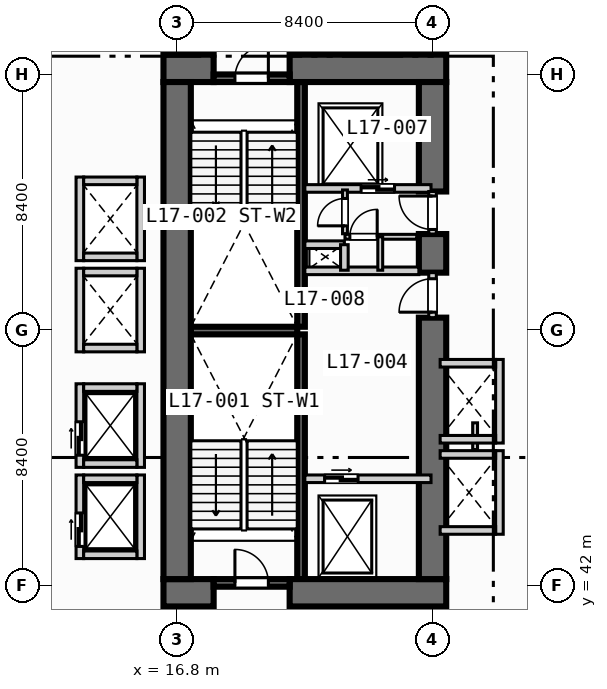
"""IFC4 building model, lengths in metres.
Left out: names, types, materials, properties, quantities, classifications, styles, units other than length and angle.
Written with IfcOpenShell. Run it as: python <this file> out.ifc"""

import sys

from ifc_helpers import new_model, si_unit, direction, frame, frame_2d, origin, place, context, subcontext, project, spatial, rectangle, extrude, element, fill, save


model = new_model("IFC4")
c1 = context("Model", 3, precision=1e-05, world=origin(), true_north=direction((0.0, 1.0)))
c2 = subcontext(c1, "Body", "Model", "MODEL_VIEW")
j1 = project(units=[si_unit("LENGTHUNIT", "METRE"), si_unit("PLANEANGLEUNIT", "RADIAN")], contexts=[c1])
p1 = place(None, origin())
s1 = spatial("IfcSite", under=j1, at=p1, CompositionType="ELEMENT")
p2 = place(p1, origin())
s2 = spatial("IfcBuilding", under=s1, at=p2, CompositionType="ELEMENT")
p3 = place(p2, frame((0.0, 0.0, 73.8)))
s3 = spatial("IfcBuildingStorey", under=s2, at=p3, CompositionType="ELEMENT", Elevation=73.8)
for number, where, z_axis, x_axis in (
    (1, (20.875, 42.2, 0.0), (0.0, 0.0, 1.0), (0.0, 1.0, 0.0)),
    (2, (20.875, 50.5, 0.0), (0.0, 0.0, 1.0), (0.0, 1.0, 0.0)),
):
    element("IfcWall", number, at=place(p3, frame(where, z_axis=z_axis, x_axis=x_axis)), inside=s3, PredefinedType="SOLIDWALL", context=c2, shape_type="SweptSolid", body=[
        extrude(rectangle(XDim=8.05, YDim=0.25, at=frame_2d((4.025, 0.0))), origin(), (0.0, 0.0, 1.0), 3.55),
    ])
p4 = place(p3, frame((17.25, 50.375, 0.0), z_axis=(0.0, 0.0, 1.0), x_axis=(1.0, 0.0, 0.0)))
e3 = element("IfcWall", 3, at=p4, inside=s3, PredefinedType="SOLIDWALL", context=c2, shape_type="SweptSolid", body=[
    extrude(rectangle(XDim=3.5, YDim=0.25, at=frame_2d((1.75, 0.0))), origin(), (0.0, 0.0, 1.0), 3.55),
])
p5 = place(p3, frame((16.35, 41.75, 0.0), z_axis=(0.0, 0.0, 1.0), x_axis=(1.0, 0.0, 0.0)))
e4 = element("IfcWall", 4, at=p5, inside=s3, PredefinedType="SHEAR", context=c2, shape_type="SweptSolid", body=[
    extrude(rectangle(XDim=1.65, YDim=0.9, at=frame_2d((0.825, 0.0))), origin(), (0.0, 0.0, 1.0), 3.55),
])
p6 = place(p3, frame((20.5, 41.75, 0.0), z_axis=(0.0, 0.0, 1.0), x_axis=(1.0, 0.0, 0.0)))
e5 = element("IfcWall", 5, at=p6, inside=s3, PredefinedType="SHEAR", context=c2, shape_type="SweptSolid", body=[
    extrude(rectangle(XDim=5.15, YDim=0.9, at=frame_2d((2.575, 0.0))), origin(), (0.0, 0.0, 1.0), 3.55),
])
p7 = place(p3, frame((16.35, 59.0, 0.0), z_axis=(0.0, 0.0, 1.0), x_axis=(1.0, 0.0, 0.0)))
e6 = element("IfcWall", 6, at=p7, inside=s3, PredefinedType="SHEAR", context=c2, shape_type="SweptSolid", body=[
    extrude(rectangle(XDim=1.65, YDim=0.9, at=frame_2d((0.825, 0.0))), origin(), (0.0, 0.0, 1.0), 3.55),
])
p8 = place(p3, frame((20.5, 59.0, 0.0), z_axis=(0.0, 0.0, 1.0), x_axis=(1.0, 0.0, 0.0)))
e7 = element("IfcWall", 7, at=p8, inside=s3, PredefinedType="SHEAR", context=c2, shape_type="SweptSolid", body=[
    extrude(rectangle(XDim=5.15, YDim=0.9, at=frame_2d((2.575, 0.0))), origin(), (0.0, 0.0, 1.0), 3.55),
])
p9 = place(p3, frame((16.8, 42.2, 0.0), z_axis=(0.0, 0.0, 1.0), x_axis=(0.0, 1.0, 0.0)))
e8 = element("IfcWall", 8, at=p9, inside=s3, PredefinedType="SHEAR", context=c2, shape_type="SweptSolid", body=[
    extrude(rectangle(XDim=16.35, YDim=0.9, at=frame_2d((8.175, 0.0))), origin(), (0.0, 0.0, 1.0), 3.55),
])
p10 = place(p3, frame((25.2, 42.2, 0.0), z_axis=(0.0, 0.0, 1.0), x_axis=(0.0, 1.0, 0.0)))
e9 = element("IfcWall", 9, at=p10, inside=s3, PredefinedType="SHEAR", context=c2, shape_type="SweptSolid", body=[
    extrude(rectangle(XDim=8.6, YDim=0.9, at=frame_2d((4.3, 0.0))), origin(), (0.0, 0.0, 1.0), 3.55),
])
p11 = place(p3, frame((25.2, 52.28, 0.0), z_axis=(0.0, 0.0, 1.0), x_axis=(0.0, 1.0, 0.0)))
e10 = element("IfcWall", 10, at=p11, inside=s3, PredefinedType="SHEAR", context=c2, shape_type="SweptSolid", body=[
    extrude(rectangle(XDim=1.27, YDim=0.9, at=frame_2d((0.635, 0.0))), origin(), (0.0, 0.0, 1.0), 3.55),
])
p12 = place(p3, frame((25.2, 54.95, 0.0), z_axis=(0.0, 0.0, 1.0), x_axis=(0.0, 1.0, 0.0)))
e11 = element("IfcWall", 11, at=p12, inside=s3, PredefinedType="SHEAR", context=c2, shape_type="SweptSolid", body=[
    extrude(rectangle(XDim=3.6, YDim=0.9, at=frame_2d((1.8, 0.0))), origin(), (0.0, 0.0, 1.0), 3.55),
])
p13 = place(p3, frame((18.0, 42.075, 0.0), z_axis=(0.0, 0.0, 1.0), x_axis=(1.0, 0.0, 0.0)))
e12 = element("IfcWall", 12, at=p13, inside=s3, PredefinedType="SOLIDWALL", context=c2, shape_type="SweptSolid", body=[
    extrude(rectangle(XDim=2.5, YDim=0.25, at=frame_2d((1.25, 0.0))), origin(), (0.0, 0.0, 1.0), 3.55),
])
p14 = place(p13, frame((0.7, 0.0, 0.0)))
e13 = element("IfcOpeningElement", 13, at=p14, cuts=e12, PredefinedType="OPENING", context=c2, shape_type="SweptSolid", body=[
    extrude(rectangle(XDim=1.1, YDim=2.15, at=frame_2d((0.55, 1.075))), frame((0.0, 0.135, 0.0), z_axis=(0.0, -1.0, 0.0), x_axis=(1.0, 0.0, 0.0)), (0.0, 0.0, 1.0), 0.27),
])
p15 = place(p3, frame((18.0, 58.675, 0.0), z_axis=(0.0, 0.0, 1.0), x_axis=(1.0, 0.0, 0.0)))
e14 = element("IfcWall", 14, at=p15, inside=s3, PredefinedType="SOLIDWALL", context=c2, shape_type="SweptSolid", body=[
    extrude(rectangle(XDim=2.5, YDim=0.25, at=frame_2d((1.25, 0.0))), origin(), (0.0, 0.0, 1.0), 3.55),
])
p16 = place(p15, frame((0.7, 0.0, 0.0)))
e15 = element("IfcOpeningElement", 15, at=p16, cuts=e14, PredefinedType="OPENING", context=c2, shape_type="SweptSolid", body=[
    extrude(rectangle(XDim=1.1, YDim=2.15, at=frame_2d((0.55, 1.075))), frame((0.0, 0.135, 0.0), z_axis=(0.0, -1.0, 0.0), x_axis=(1.0, 0.0, 0.0)), (0.0, 0.0, 1.0), 0.27),
])
p17 = place(p3, frame((21.0, 45.5, 0.0), z_axis=(0.0, 0.0, 1.0), x_axis=(1.0, 0.0, 0.0)))
e16 = element("IfcWall", 16, at=p17, inside=s3, PredefinedType="SOLIDWALL", context=c2, shape_type="SweptSolid", body=[
    extrude(rectangle(XDim=4.15, YDim=0.25, at=frame_2d((2.075, 0.0))), origin(), (0.0, 0.0, 1.0), 3.55),
])
p18 = place(p17, frame((0.65, 0.0, 0.0)))
e17 = element("IfcOpeningElement", 17, at=p18, cuts=e16, PredefinedType="OPENING", context=c2, shape_type="SweptSolid", body=[
    extrude(rectangle(XDim=1.1, YDim=2.15, at=frame_2d((0.55, 1.075))), frame((0.0, 0.135, 0.0), z_axis=(0.0, -1.0, 0.0), x_axis=(1.0, 0.0, 0.0)), (0.0, 0.0, 1.0), 0.27),
])
p19 = place(p3, frame((25.2, 50.8, 0.0), z_axis=(0.0, 0.0, 1.0), x_axis=(0.0, 1.0, 0.0)))
e18 = element("IfcWall", 18, at=p19, inside=s3, PredefinedType="SOLIDWALL", context=c2, shape_type="SweptSolid", body=[
    extrude(rectangle(XDim=1.48, YDim=0.25, at=frame_2d((0.74, 0.0))), origin(), (0.0, 0.0, 1.0), 3.55),
])
p20 = place(p19, frame((0.18, 0.0, 0.0)))
e19 = element("IfcOpeningElement", 19, at=p20, cuts=e18, PredefinedType="OPENING", context=c2, shape_type="SweptSolid", body=[
    extrude(rectangle(XDim=1.1, YDim=2.15, at=frame_2d((0.55, 1.075))), frame((0.0, 0.135, 0.0), z_axis=(0.0, -1.0, 0.0), x_axis=(1.0, 0.0, 0.0)), (0.0, 0.0, 1.0), 0.27),
])
p21 = place(p3, frame((21.0, 52.34, 0.0), z_axis=(0.0, 0.0, 1.0), x_axis=(1.0, 0.0, 0.0)))
e20 = element("IfcWall", 20, at=p21, inside=s3, PredefinedType="SOLIDWALL", context=c2, shape_type="SweptSolid", body=[
    extrude(rectangle(XDim=3.75, YDim=0.25, at=frame_2d((1.875, 0.0))), origin(), (0.0, 0.0, 1.0), 3.55),
])
p22 = place(p3, frame((21.0, 55.05, 0.0), z_axis=(0.0, 0.0, 1.0), x_axis=(1.0, 0.0, 0.0)))
e21 = element("IfcWall", 21, at=p22, inside=s3, PredefinedType="SOLIDWALL", context=c2, shape_type="SweptSolid", body=[
    extrude(rectangle(XDim=4.15, YDim=0.25, at=frame_2d((2.075, 0.0))), origin(), (0.0, 0.0, 1.0), 3.55),
])
p23 = place(p22, frame((1.85, 0.0, 0.0)))
e22 = element("IfcOpeningElement", 22, at=p23, cuts=e21, PredefinedType="OPENING", context=c2, shape_type="SweptSolid", body=[
    extrude(rectangle(XDim=1.1, YDim=2.15, at=frame_2d((0.55, 1.075))), frame((0.0, 0.135, 0.0), z_axis=(0.0, -1.0, 0.0), x_axis=(1.0, 0.0, 0.0)), (0.0, 0.0, 1.0), 0.27),
])
p24 = place(p3, frame((25.2, 53.55, 0.0), z_axis=(0.0, 0.0, 1.0), x_axis=(0.0, 1.0, 0.0)))
e23 = element("IfcWall", 23, at=p24, inside=s3, PredefinedType="SOLIDWALL", context=c2, shape_type="SweptSolid", body=[
    extrude(rectangle(XDim=1.4, YDim=0.25, at=frame_2d((0.7, 0.0))), origin(), (0.0, 0.0, 1.0), 3.55),
])
p25 = place(p24, frame((0.15, 0.0, 0.0)))
e24 = element("IfcOpeningElement", 24, at=p25, cuts=e23, PredefinedType="OPENING", context=c2, shape_type="SweptSolid", body=[
    extrude(rectangle(XDim=1.1, YDim=2.15, at=frame_2d((0.55, 1.075))), frame((0.0, 0.135, 0.0), z_axis=(0.0, -1.0, 0.0), x_axis=(1.0, 0.0, 0.0)), (0.0, 0.0, 1.0), 0.27),
])
p26 = place(p3, frame((21.0, 53.2, 0.0), z_axis=(0.0, 0.0, 1.0), x_axis=(1.0, 0.0, 0.0)))
e25 = element("IfcWall", 25, at=p26, inside=s3, PredefinedType="SOLIDWALL", context=c2, shape_type="SweptSolid", body=[
    extrude(rectangle(XDim=1.3, YDim=0.25, at=frame_2d((0.65, 0.0))), origin(), (0.0, 0.0, 1.0), 3.55),
])
p27 = place(p3, frame((22.3, 52.36, 0.0), z_axis=(0.0, 0.0, 1.0), x_axis=(0.0, 1.0, 0.0)))
e26 = element("IfcWall", 26, at=p27, inside=s3, PredefinedType="SOLIDWALL", context=c2, shape_type="SweptSolid", body=[
    extrude(rectangle(XDim=0.84, YDim=0.25, at=frame_2d((0.42, 0.0))), origin(), (0.0, 0.0, 1.0), 3.55),
])
p28 = place(p3, frame((22.32, 53.56, 0.0), z_axis=(0.0, 0.0, 1.0), x_axis=(0.0, 1.0, 0.0)))
e27 = element("IfcWall", 27, at=p28, inside=s3, PredefinedType="PARTITIONING", context=c2, shape_type="SweptSolid", body=[
    extrude(rectangle(XDim=1.44, YDim=0.16, at=frame_2d((0.72, 0.0))), origin(), (0.0, 0.0, 1.0), 3.55),
])
p29 = place(p28, frame((0.26, 0.0, 0.0)))
e28 = element("IfcOpeningElement", 28, at=p29, cuts=e27, PredefinedType="OPENING", context=c2, shape_type="SweptSolid", body=[
    extrude(rectangle(XDim=0.9, YDim=2.1, at=frame_2d((0.45, 1.05))), frame((0.0, 0.09, 0.0), z_axis=(0.0, -1.0, 0.0), x_axis=(1.0, 0.0, 0.0)), (0.0, 0.0, 1.0), 0.18),
])
p30 = place(p3, frame((22.32, 53.46, 0.0), z_axis=(0.0, 0.0, 1.0), x_axis=(1.0, 0.0, 0.0)))
e29 = element("IfcWall", 29, at=p30, inside=s3, PredefinedType="PARTITIONING", context=c2, shape_type="SweptSolid", body=[
    extrude(rectangle(XDim=2.36, YDim=0.16, at=frame_2d((1.18, 0.0))), origin(), (0.0, 0.0, 1.0), 3.55),
])
p31 = place(p30, frame((0.16, 0.0, 0.0)))
e30 = element("IfcOpeningElement", 30, at=p31, cuts=e29, PredefinedType="OPENING", context=c2, shape_type="SweptSolid", body=[
    extrude(rectangle(XDim=0.9, YDim=2.1, at=frame_2d((0.45, 1.05))), frame((0.0, 0.09, 0.0), z_axis=(0.0, -1.0, 0.0), x_axis=(1.0, 0.0, 0.0)), (0.0, 0.0, 1.0), 0.18),
])
p32 = place(p3, frame((23.48, 52.36, 0.0), z_axis=(0.0, 0.0, 1.0), x_axis=(0.0, 1.0, 0.0)))
e31 = element("IfcWall", 31, at=p32, inside=s3, PredefinedType="PARTITIONING", context=c2, shape_type="SweptSolid", body=[
    extrude(rectangle(XDim=1.1, YDim=0.16, at=frame_2d((0.55, 0.0))), origin(), (0.0, 0.0, 1.0), 3.55),
])
p33 = place(p3, frame((13.6, 42.875, 0.0), z_axis=(0.0, 0.0, 1.0), x_axis=(0.0, 1.0, 0.0)))
e32 = element("IfcWall", 32, at=p33, inside=s3, PredefinedType="SOLIDWALL", context=c2, shape_type="SweptSolid", body=[
    extrude(rectangle(XDim=2.75, YDim=0.25, at=frame_2d((1.375, 0.0))), origin(), (0.0, 0.0, 1.0), 3.55),
])
p34 = place(p33, frame((0.4, 0.0, 0.0)))
e33 = element("IfcOpeningElement", 33, at=p34, cuts=e32, PredefinedType="OPENING", context=c2, shape_type="SweptSolid", body=[
    extrude(rectangle(XDim=1.1, YDim=2.15, at=frame_2d((0.55, 1.075))), frame((0.0, 0.135, 0.0), z_axis=(0.0, -1.0, 0.0), x_axis=(1.0, 0.0, 0.0)), (0.0, 0.0, 1.0), 0.27),
])
p35 = place(p3, frame((15.6, 42.875, 0.0), z_axis=(0.0, 0.0, 1.0), x_axis=(0.0, 1.0, 0.0)))
e34 = element("IfcWall", 34, at=p35, inside=s3, PredefinedType="SOLIDWALL", context=c2, shape_type="SweptSolid", body=[
    extrude(rectangle(XDim=2.75, YDim=0.25, at=frame_2d((1.375, 0.0))), origin(), (0.0, 0.0, 1.0), 3.55),
])
for number, where, z_axis, x_axis in (
    (35, (13.725, 43.0, 0.0), (0.0, 0.0, 1.0), (1.0, 0.0, 0.0)),
    (36, (13.725, 45.5, 0.0), (0.0, 0.0, 1.0), (1.0, 0.0, 0.0)),
):
    element("IfcWall", number, at=place(p3, frame(where, z_axis=z_axis, x_axis=x_axis)), inside=s3, PredefinedType="SOLIDWALL", context=c2, shape_type="SweptSolid", body=[
        extrude(rectangle(XDim=1.75, YDim=0.25, at=frame_2d((0.875, 0.0))), origin(), (0.0, 0.0, 1.0), 3.55),
    ])
p36 = place(p3, frame((13.6, 45.875, 0.0), z_axis=(0.0, 0.0, 1.0), x_axis=(0.0, 1.0, 0.0)))
e37 = element("IfcWall", 37, at=p36, inside=s3, PredefinedType="SOLIDWALL", context=c2, shape_type="SweptSolid", body=[
    extrude(rectangle(XDim=2.75, YDim=0.25, at=frame_2d((1.375, 0.0))), origin(), (0.0, 0.0, 1.0), 3.55),
])
p37 = place(p36, frame((0.4, 0.0, 0.0)))
e38 = element("IfcOpeningElement", 38, at=p37, cuts=e37, PredefinedType="OPENING", context=c2, shape_type="SweptSolid", body=[
    extrude(rectangle(XDim=1.1, YDim=2.15, at=frame_2d((0.55, 1.075))), frame((0.0, 0.135, 0.0), z_axis=(0.0, -1.0, 0.0), x_axis=(1.0, 0.0, 0.0)), (0.0, 0.0, 1.0), 0.27),
])
p38 = place(p3, frame((15.6, 45.875, 0.0), z_axis=(0.0, 0.0, 1.0), x_axis=(0.0, 1.0, 0.0)))
e39 = element("IfcWall", 39, at=p38, inside=s3, PredefinedType="SOLIDWALL", context=c2, shape_type="SweptSolid", body=[
    extrude(rectangle(XDim=2.75, YDim=0.25, at=frame_2d((1.375, 0.0))), origin(), (0.0, 0.0, 1.0), 3.55),
])
for number, where, z_axis, x_axis in (
    (40, (13.725, 46.0, 0.0), (0.0, 0.0, 1.0), (1.0, 0.0, 0.0)),
    (41, (13.725, 48.5, 0.0), (0.0, 0.0, 1.0), (1.0, 0.0, 0.0)),
):
    element("IfcWall", number, at=place(p3, frame(where, z_axis=z_axis, x_axis=x_axis)), inside=s3, PredefinedType="SOLIDWALL", context=c2, shape_type="SweptSolid", body=[
        extrude(rectangle(XDim=1.75, YDim=0.25, at=frame_2d((0.875, 0.0))), origin(), (0.0, 0.0, 1.0), 3.55),
    ])
for number, where, z_axis, x_axis in (
    (42, (13.6, 49.675, 0.0), (0.0, 0.0, 1.0), (0.0, 1.0, 0.0)),
    (43, (15.6, 49.675, 0.0), (0.0, 0.0, 1.0), (0.0, 1.0, 0.0)),
):
    element("IfcWall", number, at=place(p3, frame(where, z_axis=z_axis, x_axis=x_axis)), inside=s3, PredefinedType="SOLIDWALL", context=c2, shape_type="SweptSolid", body=[
        extrude(rectangle(XDim=2.75, YDim=0.25, at=frame_2d((1.375, 0.0))), origin(), (0.0, 0.0, 1.0), 3.55),
    ])
for number, where, z_axis, x_axis in (
    (44, (13.725, 49.8, 0.0), (0.0, 0.0, 1.0), (1.0, 0.0, 0.0)),
    (45, (13.725, 52.3, 0.0), (0.0, 0.0, 1.0), (1.0, 0.0, 0.0)),
):
    element("IfcWall", number, at=place(p3, frame(where, z_axis=z_axis, x_axis=x_axis)), inside=s3, PredefinedType="SOLIDWALL", context=c2, shape_type="SweptSolid", body=[
        extrude(rectangle(XDim=1.75, YDim=0.25, at=frame_2d((0.875, 0.0))), origin(), (0.0, 0.0, 1.0), 3.55),
    ])
for number, where, z_axis, x_axis in (
    (46, (13.6, 52.675, 0.0), (0.0, 0.0, 1.0), (0.0, 1.0, 0.0)),
    (47, (15.6, 52.675, 0.0), (0.0, 0.0, 1.0), (0.0, 1.0, 0.0)),
):
    element("IfcWall", number, at=place(p3, frame(where, z_axis=z_axis, x_axis=x_axis)), inside=s3, PredefinedType="SOLIDWALL", context=c2, shape_type="SweptSolid", body=[
        extrude(rectangle(XDim=2.75, YDim=0.25, at=frame_2d((1.375, 0.0))), origin(), (0.0, 0.0, 1.0), 3.55),
    ])
for number, where, z_axis, x_axis in (
    (48, (13.725, 52.8, 0.0), (0.0, 0.0, 1.0), (1.0, 0.0, 0.0)),
    (49, (13.725, 55.3, 0.0), (0.0, 0.0, 1.0), (1.0, 0.0, 0.0)),
):
    element("IfcWall", number, at=place(p3, frame(where, z_axis=z_axis, x_axis=x_axis)), inside=s3, PredefinedType="SOLIDWALL", context=c2, shape_type="SweptSolid", body=[
        extrude(rectangle(XDim=1.75, YDim=0.25, at=frame_2d((0.875, 0.0))), origin(), (0.0, 0.0, 1.0), 3.55),
    ])
p39 = place(p3, frame((27.4, 43.675, 0.0), z_axis=(0.0, 0.0, 1.0), x_axis=(0.0, 1.0, 0.0)))
e50 = element("IfcWall", 50, at=p39, inside=s3, PredefinedType="SOLIDWALL", context=c2, shape_type="SweptSolid", body=[
    extrude(rectangle(XDim=2.75, YDim=0.25, at=frame_2d((1.375, 0.0))), origin(), (0.0, 0.0, 1.0), 3.55),
])
for number, where, z_axis, x_axis in (
    (51, (25.45, 43.8, 0.0), (0.0, 0.0, 1.0), (1.0, 0.0, 0.0)),
    (52, (25.45, 46.3, 0.0), (0.0, 0.0, 1.0), (1.0, 0.0, 0.0)),
):
    element("IfcWall", number, at=place(p3, frame(where, z_axis=z_axis, x_axis=x_axis)), inside=s3, PredefinedType="SOLIDWALL", context=c2, shape_type="SweptSolid", body=[
        extrude(rectangle(XDim=1.825, YDim=0.25, at=frame_2d((0.913, 0.0))), origin(), (0.0, 0.0, 1.0), 3.55),
    ])
p40 = place(p3, frame((26.6, 46.46, 0.0), z_axis=(0.0, 0.0, 1.0), x_axis=(0.0, 1.0, 0.0)))
e53 = element("IfcWall", 53, at=p40, inside=s3, PredefinedType="PARTITIONING", context=c2, shape_type="SweptSolid", body=[
    extrude(rectangle(XDim=0.88, YDim=0.16, at=frame_2d((0.44, 0.0))), origin(), (0.0, 0.0, 1.0), 3.55),
])
p41 = place(p3, frame((27.4, 46.675, 0.0), z_axis=(0.0, 0.0, 1.0), x_axis=(0.0, 1.0, 0.0)))
e54 = element("IfcWall", 54, at=p41, inside=s3, PredefinedType="SOLIDWALL", context=c2, shape_type="SweptSolid", body=[
    extrude(rectangle(XDim=2.75, YDim=0.25, at=frame_2d((1.375, 0.0))), origin(), (0.0, 0.0, 1.0), 3.55),
])
for number, where, z_axis, x_axis in (
    (55, (25.45, 46.8, 0.0), (0.0, 0.0, 1.0), (1.0, 0.0, 0.0)),
    (56, (25.45, 49.3, 0.0), (0.0, 0.0, 1.0), (1.0, 0.0, 0.0)),
):
    element("IfcWall", number, at=place(p3, frame(where, z_axis=z_axis, x_axis=x_axis)), inside=s3, PredefinedType="SOLIDWALL", context=c2, shape_type="SweptSolid", body=[
        extrude(rectangle(XDim=1.825, YDim=0.25, at=frame_2d((0.913, 0.0))), origin(), (0.0, 0.0, 1.0), 3.55),
    ])
p42 = place(p14, origin())
e57 = element("IfcDoor", 57, at=p42, inside=s3, OperationType="SINGLE_SWING_LEFT", PredefinedType="DOOR", context=c2, shape_type="SweptSolid", body=[
    extrude(rectangle(XDim=1.1, YDim=2.15, at=frame_2d((0.55, 1.075))), frame((0.0, 0.025, 0.0), z_axis=(0.0, -1.0, 0.0), x_axis=(1.0, 0.0, 0.0)), (0.0, 0.0, 1.0), 0.05),
])
fill(e13, e57)
p43 = place(p16, origin())
e58 = element("IfcDoor", 58, at=p43, inside=s3, OperationType="SINGLE_SWING_RIGHT", PredefinedType="DOOR", context=c2, shape_type="SweptSolid", body=[
    extrude(rectangle(XDim=1.1, YDim=2.15, at=frame_2d((0.55, 1.075))), frame((0.0, 0.025, 0.0), z_axis=(0.0, -1.0, 0.0), x_axis=(1.0, 0.0, 0.0)), (0.0, 0.0, 1.0), 0.05),
])
fill(e15, e58)
p44 = place(p18, origin())
e59 = element("IfcDoor", 59, at=p44, inside=s3, OperationType="SLIDING_TO_LEFT", PredefinedType="DOOR", context=c2, shape_type="SweptSolid", body=[
    extrude(rectangle(XDim=1.1, YDim=2.15, at=frame_2d((0.55, 1.075))), frame((0.0, 0.025, 0.0), z_axis=(0.0, -1.0, 0.0), x_axis=(1.0, 0.0, 0.0)), (0.0, 0.0, 1.0), 0.05),
])
fill(e17, e59)
p45 = place(p20, origin())
e60 = element("IfcDoor", 60, at=p45, inside=s3, OperationType="SINGLE_SWING_LEFT", PredefinedType="DOOR", context=c2, shape_type="SweptSolid", body=[
    extrude(rectangle(XDim=1.1, YDim=2.15, at=frame_2d((0.55, 1.075))), frame((0.0, 0.025, 0.0), z_axis=(0.0, -1.0, 0.0), x_axis=(1.0, 0.0, 0.0)), (0.0, 0.0, 1.0), 0.05),
])
fill(e19, e60)
p46 = place(p23, origin())
e61 = element("IfcDoor", 61, at=p46, inside=s3, OperationType="SLIDING_TO_LEFT", PredefinedType="DOOR", context=c2, shape_type="SweptSolid", body=[
    extrude(rectangle(XDim=1.1, YDim=2.15, at=frame_2d((0.55, 1.075))), frame((0.0, 0.025, 0.0), z_axis=(0.0, -1.0, 0.0), x_axis=(1.0, 0.0, 0.0)), (0.0, 0.0, 1.0), 0.05),
])
fill(e22, e61)
p47 = place(p25, origin())
e62 = element("IfcDoor", 62, at=p47, inside=s3, OperationType="SINGLE_SWING_RIGHT", PredefinedType="DOOR", context=c2, shape_type="SweptSolid", body=[
    extrude(rectangle(XDim=1.1, YDim=2.15, at=frame_2d((0.55, 1.075))), frame((0.0, 0.025, 0.0), z_axis=(0.0, -1.0, 0.0), x_axis=(1.0, 0.0, 0.0)), (0.0, 0.0, 1.0), 0.05),
])
fill(e24, e62)
p48 = place(p29, origin())
e63 = element("IfcDoor", 63, at=p48, inside=s3, OperationType="SINGLE_SWING_LEFT", PredefinedType="DOOR", context=c2, shape_type="SweptSolid", body=[
    extrude(rectangle(XDim=0.9, YDim=2.1, at=frame_2d((0.45, 1.05))), frame((0.0, 0.025, 0.0), z_axis=(0.0, -1.0, 0.0), x_axis=(1.0, 0.0, 0.0)), (0.0, 0.0, 1.0), 0.05),
])
fill(e28, e63)
p49 = place(p31, origin())
e64 = element("IfcDoor", 64, at=p49, inside=s3, OperationType="SINGLE_SWING_RIGHT", PredefinedType="DOOR", context=c2, shape_type="SweptSolid", body=[
    extrude(rectangle(XDim=0.9, YDim=2.1, at=frame_2d((0.45, 1.05))), frame((0.0, 0.025, 0.0), z_axis=(0.0, -1.0, 0.0), x_axis=(1.0, 0.0, 0.0)), (0.0, 0.0, 1.0), 0.05),
])
fill(e30, e64)
p50 = place(p34, origin())
e65 = element("IfcDoor", 65, at=p50, inside=s3, OperationType="SLIDING_TO_LEFT", PredefinedType="DOOR", context=c2, shape_type="SweptSolid", body=[
    extrude(rectangle(XDim=1.1, YDim=2.15, at=frame_2d((0.55, 1.075))), frame((0.0, 0.025, 0.0), z_axis=(0.0, -1.0, 0.0), x_axis=(1.0, 0.0, 0.0)), (0.0, 0.0, 1.0), 0.05),
])
fill(e33, e65)
p51 = place(p37, origin())
e66 = element("IfcDoor", 66, at=p51, inside=s3, OperationType="SLIDING_TO_LEFT", PredefinedType="DOOR", context=c2, shape_type="SweptSolid", body=[
    extrude(rectangle(XDim=1.1, YDim=2.15, at=frame_2d((0.55, 1.075))), frame((0.0, 0.025, 0.0), z_axis=(0.0, -1.0, 0.0), x_axis=(1.0, 0.0, 0.0)), (0.0, 0.0, 1.0), 0.05),
])
fill(e38, e66)
save(model, sys.argv[1])
